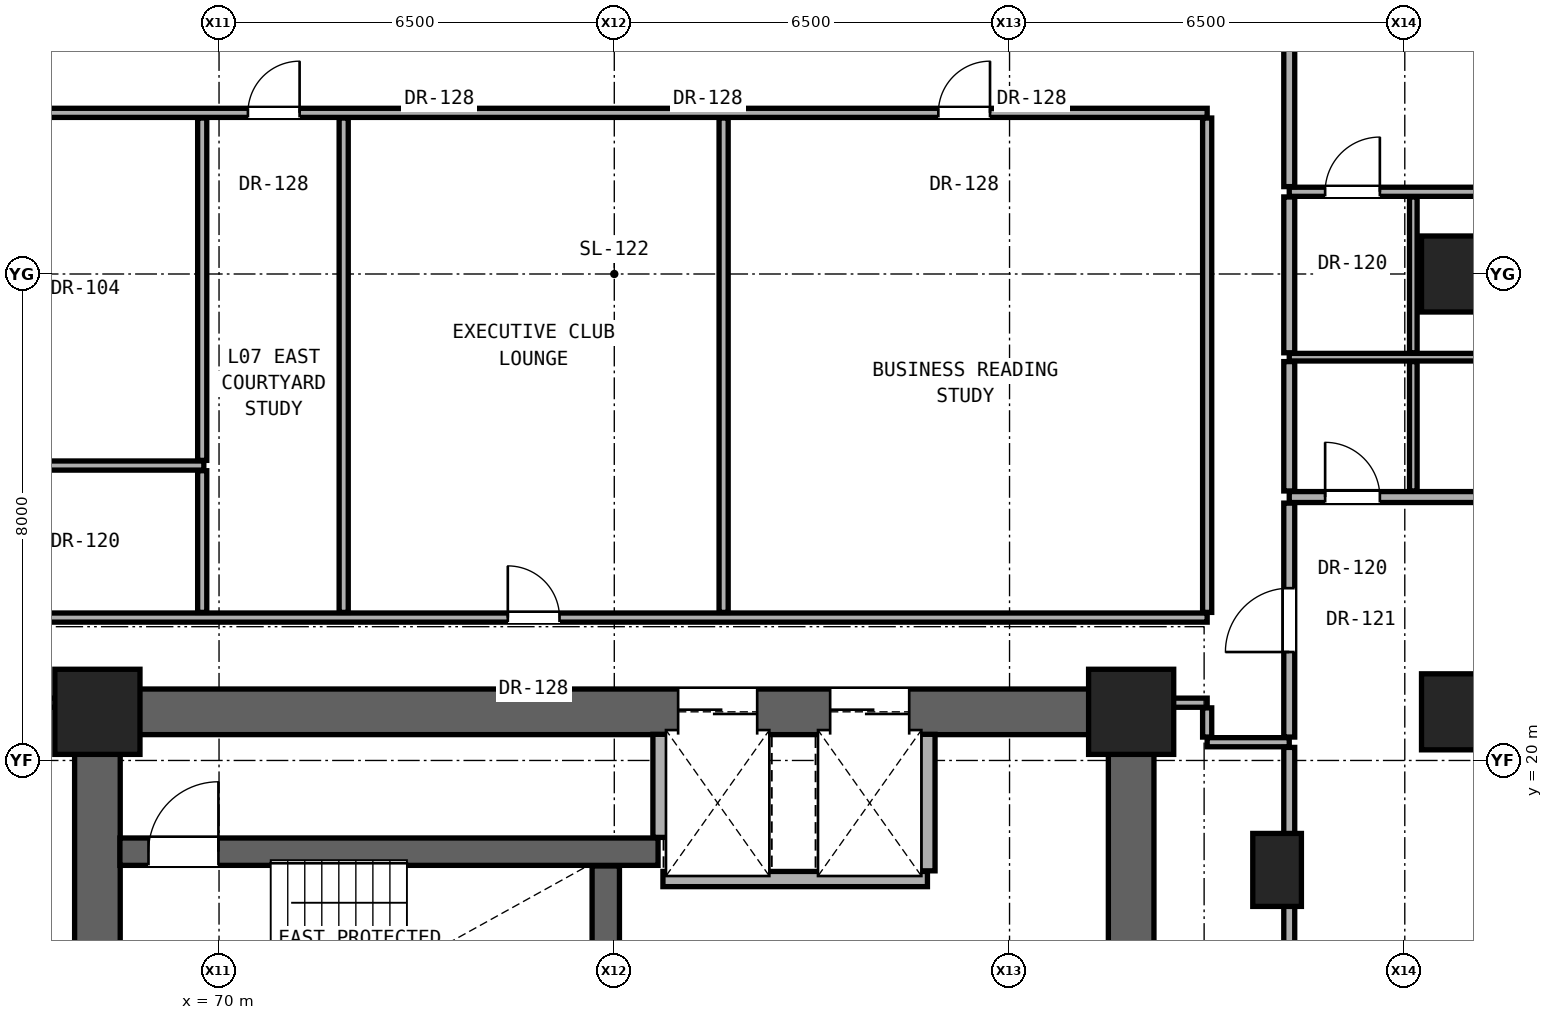
"""IFC4 building model, lengths in metres.
Left out: names, types, materials, properties, quantities, classifications, styles, units other than length and angle.
Written with IfcOpenShell. Run it as: python <this file> out.ifc"""

import sys

from ifc_helpers import new_model, si_unit, direction, frame, frame_2d, origin, origin_2d, place, context, subcontext, project, spatial, rectangle, hollow_rectangle, extrude, element, fill, save


model = new_model("IFC4")
c1 = context("Model", 3, precision=1e-05, world=origin(), true_north=direction((0.0, 1.0)))
c2 = subcontext(c1, "Body", "Model", "MODEL_VIEW")
j1 = project(units=[si_unit("LENGTHUNIT", "METRE"), si_unit("PLANEANGLEUNIT", "RADIAN")], contexts=[c1])
p1 = place(None, origin())
s1 = spatial("IfcSite", under=j1, at=p1, CompositionType="ELEMENT")
p2 = place(p1, origin())
s2 = spatial("IfcBuilding", under=s1, at=p2, CompositionType="ELEMENT")
p3 = place(p2, frame((0.0, 0.0, 29.0)))
s3 = spatial("IfcBuildingStorey", under=s2, at=p3, CompositionType="ELEMENT", Elevation=29.0)
for number, where, z_axis, x_axis in (
    (1, (68.0, 20.8, 0.0), (0.0, 0.0, 1.0), (1.0, 0.0, 0.0)),
    (2, (85.0, 20.8, 0.0), (0.0, 0.0, 1.0), (1.0, 0.0, 0.0)),
):
    element("IfcColumn", number, at=place(p3, frame(where, z_axis=z_axis, x_axis=x_axis)), inside=s3, PredefinedType="COLUMN", context=c2, shape_type="SweptSolid", body=[
        extrude(rectangle(XDim=1.4, YDim=1.4, at=origin_2d()), origin(), (0.0, 0.0, 1.0), 3.3),
    ])
for number, where, z_axis, x_axis in (
    (3, (90.4, 20.8, 0.0), (0.0, 0.0, 1.0), (1.0, 0.0, 0.0)),
    (4, (90.4, 28.0, 0.0), (0.0, 0.0, 1.0), (1.0, 0.0, 0.0)),
):
    element("IfcColumn", number, at=place(p3, frame(where, z_axis=z_axis, x_axis=x_axis)), inside=s3, PredefinedType="COLUMN", context=c2, shape_type="SweptSolid", body=[
        extrude(hollow_rectangle(XDim=1.25, YDim=1.25, WallThickness=0.07, at=origin_2d()), origin(), (0.0, 0.0, 1.0), 3.3),
    ])
p4 = place(p3, frame((87.4, 18.2, 0.0), z_axis=(0.0, 0.0, 1.0), x_axis=(1.0, 0.0, 0.0)))
e5 = element("IfcColumn", 5, at=p4, inside=s3, PredefinedType="PILASTER", context=c2, shape_type="SweptSolid", body=[
    extrude(rectangle(XDim=0.8, YDim=1.2, at=origin_2d()), origin(), (0.0, 0.0, 1.0), 3.3),
])
for number, where, z_axis, x_axis in (
    (6, (68.0, 15.2, 0.0), (0.0, 0.0, 1.0), (0.0, 1.0, 0.0)),
    (7, (85.0, 15.2, 0.0), (0.0, 0.0, 1.0), (0.0, 1.0, 0.0)),
):
    element("IfcWall", number, at=place(p3, frame(where, z_axis=z_axis, x_axis=x_axis)), inside=s3, PredefinedType="SHEAR", context=c2, shape_type="SweptSolid", body=[
        extrude(rectangle(XDim=5.6, YDim=0.75, at=frame_2d((2.8, 0.0))), origin(), (0.0, 0.0, 1.0), 3.06),
    ])
p5 = place(p3, frame((68.0, 20.8, 0.0), z_axis=(0.0, 0.0, 1.0), x_axis=(1.0, 0.0, 0.0)))
e8 = element("IfcWall", 8, at=p5, inside=s3, PredefinedType="SHEAR", context=c2, shape_type="SweptSolid", body=[
    extrude(rectangle(XDim=17.0, YDim=0.75, at=frame_2d((8.5, 0.0))), origin(), (0.0, 0.0, 1.0), 3.06),
])
p6 = place(p5, frame((9.55, 0.0, 0.0)))
e9 = element("IfcOpeningElement", 9, at=p6, cuts=e8, PredefinedType="OPENING", context=c2, shape_type="SweptSolid", body=[
    extrude(rectangle(XDim=1.3, YDim=2.3, at=frame_2d((0.65, 1.15))), frame((0.0, 0.385, 0.0), z_axis=(0.0, -1.0, 0.0), x_axis=(1.0, 0.0, 0.0)), (0.0, 0.0, 1.0), 0.77),
])
p7 = place(p5, frame((12.05, 0.0, 0.0)))
e10 = element("IfcOpeningElement", 10, at=p7, cuts=e8, PredefinedType="OPENING", context=c2, shape_type="SweptSolid", body=[
    extrude(rectangle(XDim=1.3, YDim=2.3, at=frame_2d((0.65, 1.15))), frame((0.0, 0.385, 0.0), z_axis=(0.0, -1.0, 0.0), x_axis=(1.0, 0.0, 0.0)), (0.0, 0.0, 1.0), 0.77),
])
p8 = place(p3, frame((77.3, 18.05, 0.0), z_axis=(0.0, 0.0, 1.0), x_axis=(1.0, 0.0, 0.0)))
e11 = element("IfcWall", 11, at=p8, inside=s3, PredefinedType="SOLIDWALL", context=c2, shape_type="SweptSolid", body=[
    extrude(rectangle(XDim=4.35, YDim=0.25, at=frame_2d((2.175, 0.0))), origin(), (0.0, 0.0, 1.0), 3.06),
])
p9 = place(p3, frame((68.37, 18.5, 0.0), z_axis=(0.0, 0.0, 1.0), x_axis=(1.0, 0.0, 0.0)))
e12 = element("IfcWall", 12, at=p9, inside=s3, PredefinedType="SHEAR", context=c2, shape_type="SweptSolid", body=[
    extrude(rectangle(XDim=8.85, YDim=0.45, at=frame_2d((4.425, 0.0))), origin(), (0.0, 0.0, 1.0), 3.06),
])
p10 = place(p9, frame((0.47, 0.0, 0.0)))
e13 = element("IfcOpeningElement", 13, at=p10, cuts=e12, PredefinedType="OPENING", context=c2, shape_type="SweptSolid", body=[
    extrude(rectangle(XDim=1.15, YDim=2.2, at=frame_2d((0.575, 1.1))), frame((0.0, 0.235, 0.0), z_axis=(0.0, -1.0, 0.0), x_axis=(1.0, 0.0, 0.0)), (0.0, 0.0, 1.0), 0.47),
])
p11 = place(p3, frame((86.25, 20.3, 0.0), z_axis=(0.0, 0.0, 1.0), x_axis=(1.0, 0.0, 0.0)))
e14 = element("IfcWall", 14, at=p11, inside=s3, PredefinedType="PARTITIONING", context=c2, shape_type="SweptSolid", body=[
    extrude(rectangle(XDim=1.35, YDim=0.15, at=frame_2d((0.675, 0.0))), origin(), (0.0, 0.0, 1.0), 3.06),
])
p12 = place(p3, frame((66.62, 20.95, 0.0), z_axis=(0.0, 0.0, 1.0), x_axis=(1.0, 0.0, 0.0)))
e15 = element("IfcWall", 15, at=p12, inside=s3, PredefinedType="PARTITIONING", context=c2, shape_type="SweptSolid", body=[
    extrude(rectangle(XDim=1.01, YDim=0.15, at=frame_2d((0.505, 0.0))), origin(), (0.0, 0.0, 1.0), 2.452),
])
p13 = place(p3, frame((85.37, 20.95, 0.0), z_axis=(0.0, 0.0, 1.0), x_axis=(1.0, 0.0, 0.0)))
e16 = element("IfcWall", 16, at=p13, inside=s3, PredefinedType="PARTITIONING", context=c2, shape_type="SweptSolid", body=[
    extrude(rectangle(XDim=0.88, YDim=0.15, at=frame_2d((0.44, 0.0))), origin(), (0.0, 0.0, 1.0), 2.452),
])
p14 = place(p3, frame((66.62, 22.35, 0.0), z_axis=(0.0, 0.0, 1.0), x_axis=(1.0, 0.0, 0.0)))
e17 = element("IfcWall", 17, at=p14, inside=s3, PredefinedType="PARTITIONING", context=c2, shape_type="SweptSolid", body=[
    extrude(rectangle(XDim=19.63, YDim=0.15, at=frame_2d((9.815, 0.0))), origin(), (0.0, 0.0, 1.0), 2.125),
])
p15 = place(p14, frame((8.129, 0.0, 0.0)))
e18 = element("IfcOpeningElement", 18, at=p15, cuts=e17, PredefinedType="OPENING", context=c2, shape_type="SweptSolid", body=[
    extrude(rectangle(XDim=0.85, YDim=2.01, at=frame_2d((0.425, 1.005))), frame((0.0, 0.085, 0.0), z_axis=(0.0, -1.0, 0.0), x_axis=(1.0, 0.0, 0.0)), (0.0, 0.0, 1.0), 0.17),
])
p16 = place(p3, frame((87.6, 24.332, 0.0), z_axis=(0.0, 0.0, 1.0), x_axis=(1.0, 0.0, 0.0)))
e19 = element("IfcWall", 19, at=p16, inside=s3, PredefinedType="PARTITIONING", context=c2, shape_type="SweptSolid", body=[
    extrude(rectangle(XDim=7.156, YDim=0.18, at=frame_2d((3.578, 0.0))), origin(), (0.0, 0.0, 1.0), 2.196),
])
p17 = place(p16, frame((4.103, 0.0, 0.0)))
e20 = element("IfcOpeningElement", 20, at=p17, cuts=e19, PredefinedType="OPENING", context=c2, shape_type="SweptSolid", body=[
    extrude(rectangle(XDim=0.95, YDim=2.15, at=frame_2d((0.475, 1.075))), frame((0.0, 0.1, 0.0), z_axis=(0.0, -1.0, 0.0), x_axis=(1.0, 0.0, 0.0)), (0.0, 0.0, 1.0), 0.2),
])
p18 = place(p16, frame((0.59, 0.0, 0.0)))
e21 = element("IfcOpeningElement", 21, at=p18, cuts=e19, PredefinedType="OPENING", context=c2, shape_type="SweptSolid", body=[
    extrude(rectangle(XDim=0.9, YDim=2.1, at=frame_2d((0.45, 1.05))), frame((0.0, 0.1, 0.0), z_axis=(0.0, -1.0, 0.0), x_axis=(1.0, 0.0, 0.0)), (0.0, 0.0, 1.0), 0.2),
])
p19 = place(p3, frame((66.62, 24.85, 0.0), z_axis=(0.0, 0.0, 1.0), x_axis=(1.0, 0.0, 0.0)))
e22 = element("IfcWall", 22, at=p19, inside=s3, PredefinedType="PARTITIONING", context=c2, shape_type="SweptSolid", body=[
    extrude(rectangle(XDim=3.13, YDim=0.15, at=frame_2d((1.565, 0.0))), origin(), (0.0, 0.0, 1.0), 2.125),
])
p20 = place(p3, frame((87.6, 26.632, 0.0), z_axis=(0.0, 0.0, 1.0), x_axis=(1.0, 0.0, 0.0)))
e23 = element("IfcWall", 23, at=p20, inside=s3, PredefinedType="PARTITIONING", context=c2, shape_type="SweptSolid", body=[
    extrude(rectangle(XDim=7.156, YDim=0.125, at=frame_2d((3.578, 0.0))), origin(), (0.0, 0.0, 1.0), 2.196),
])
p21 = place(p3, frame((87.6, 29.352, 0.0), z_axis=(0.0, 0.0, 1.0), x_axis=(1.0, 0.0, 0.0)))
e24 = element("IfcWall", 24, at=p21, inside=s3, PredefinedType="PARTITIONING", context=c2, shape_type="SweptSolid", body=[
    extrude(rectangle(XDim=7.156, YDim=0.15, at=frame_2d((3.578, 0.0))), origin(), (0.0, 0.0, 1.0), 2.196),
])
p22 = place(p21, frame((4.103, 0.0, 0.0)))
e25 = element("IfcOpeningElement", 25, at=p22, cuts=e24, PredefinedType="OPENING", context=c2, shape_type="SweptSolid", body=[
    extrude(rectangle(XDim=0.95, YDim=2.15, at=frame_2d((0.475, 1.075))), frame((0.0, 0.085, 0.0), z_axis=(0.0, -1.0, 0.0), x_axis=(1.0, 0.0, 0.0)), (0.0, 0.0, 1.0), 0.17),
])
p23 = place(p21, frame((0.59, 0.0, 0.0)))
e26 = element("IfcOpeningElement", 26, at=p23, cuts=e24, PredefinedType="OPENING", context=c2, shape_type="SweptSolid", body=[
    extrude(rectangle(XDim=0.9, YDim=2.1, at=frame_2d((0.45, 1.05))), frame((0.0, 0.085, 0.0), z_axis=(0.0, -1.0, 0.0), x_axis=(1.0, 0.0, 0.0)), (0.0, 0.0, 1.0), 0.17),
])
p24 = place(p3, frame((66.62, 30.65, 0.0), z_axis=(0.0, 0.0, 1.0), x_axis=(1.0, 0.0, 0.0)))
e27 = element("IfcWall", 27, at=p24, inside=s3, PredefinedType="PARTITIONING", context=c2, shape_type="SweptSolid", body=[
    extrude(rectangle(XDim=19.63, YDim=0.15, at=frame_2d((9.815, 0.0))), origin(), (0.0, 0.0, 1.0), 2.125),
])
p25 = place(p24, frame((3.855, 0.0, 0.0)))
e28 = element("IfcOpeningElement", 28, at=p25, cuts=e27, PredefinedType="OPENING", context=c2, shape_type="SweptSolid", body=[
    extrude(rectangle(XDim=0.85, YDim=2.01, at=frame_2d((0.425, 1.005))), frame((0.0, 0.085, 0.0), z_axis=(0.0, -1.0, 0.0), x_axis=(1.0, 0.0, 0.0)), (0.0, 0.0, 1.0), 0.17),
])
p26 = place(p24, frame((15.209, 0.0, 0.0)))
e29 = element("IfcOpeningElement", 29, at=p26, cuts=e27, PredefinedType="OPENING", context=c2, shape_type="SweptSolid", body=[
    extrude(rectangle(XDim=0.85, YDim=2.01, at=frame_2d((0.425, 1.005))), frame((0.0, 0.085, 0.0), z_axis=(0.0, -1.0, 0.0), x_axis=(1.0, 0.0, 0.0)), (0.0, 0.0, 1.0), 0.17),
])
p27 = place(p3, frame((69.723, 22.435, 0.0), z_axis=(0.0, 0.0, 1.0), x_axis=(0.0, 1.0, 0.0)))
e30 = element("IfcWall", 30, at=p27, inside=s3, PredefinedType="PARTITIONING", context=c2, shape_type="SweptSolid", body=[
    extrude(rectangle(XDim=2.33, YDim=0.15, at=frame_2d((1.165, 0.0))), origin(), (0.0, 0.0, 1.0), 3.06),
])
p28 = place(p3, frame((69.723, 24.935, 0.0), z_axis=(0.0, 0.0, 1.0), x_axis=(0.0, 1.0, 0.0)))
e31 = element("IfcWall", 31, at=p28, inside=s3, PredefinedType="PARTITIONING", context=c2, shape_type="SweptSolid", body=[
    extrude(rectangle(XDim=5.63, YDim=0.15, at=frame_2d((2.815, 0.0))), origin(), (0.0, 0.0, 1.0), 2.125),
])
p29 = place(p3, frame((72.05, 22.435, 0.0), z_axis=(0.0, 0.0, 1.0), x_axis=(0.0, 1.0, 0.0)))
e32 = element("IfcWall", 32, at=p29, inside=s3, PredefinedType="PARTITIONING", context=c2, shape_type="SweptSolid", body=[
    extrude(rectangle(XDim=8.13, YDim=0.15, at=frame_2d((4.065, 0.0))), origin(), (0.0, 0.0, 1.0), 2.125),
])
p30 = place(p3, frame((76.36, 15.915, 0.0), z_axis=(0.0, 0.0, 1.0), x_axis=(0.0, 1.0, 0.0)))
e33 = element("IfcWall", 33, at=p30, inside=s3, PredefinedType="SHEAR", context=c2, shape_type="SweptSolid", body=[
    extrude(rectangle(XDim=2.35, YDim=0.45, at=frame_2d((1.175, 0.0))), origin(), (0.0, 0.0, 1.0), 3.06),
])
p31 = place(p3, frame((77.26, 18.735, 0.0), z_axis=(0.0, 0.0, 1.0), x_axis=(0.0, 1.0, 0.0)))
e34 = element("IfcWall", 34, at=p31, inside=s3, PredefinedType="SOLIDWALL", context=c2, shape_type="SweptSolid", body=[
    extrude(rectangle(XDim=1.695, YDim=0.25, at=frame_2d((0.847, 0.0))), origin(), (0.0, 0.0, 1.0), 3.06),
])
p32 = place(p3, frame((78.298, 22.435, 0.0), z_axis=(0.0, 0.0, 1.0), x_axis=(0.0, 1.0, 0.0)))
e35 = element("IfcWall", 35, at=p32, inside=s3, PredefinedType="PARTITIONING", context=c2, shape_type="SweptSolid", body=[
    extrude(rectangle(XDim=8.13, YDim=0.15, at=frame_2d((4.065, 0.0))), origin(), (0.0, 0.0, 1.0), 2.125),
])
p33 = place(p3, frame((81.65, 18.185, 0.0), z_axis=(0.0, 0.0, 1.0), x_axis=(0.0, 1.0, 0.0)))
e36 = element("IfcWall", 36, at=p33, inside=s3, PredefinedType="SOLIDWALL", context=c2, shape_type="SweptSolid", body=[
    extrude(rectangle(XDim=2.245, YDim=0.25, at=frame_2d((1.123, 0.0))), origin(), (0.0, 0.0, 1.0), 3.06),
])
p34 = place(p3, frame((86.25, 20.385, 0.0), z_axis=(0.0, 0.0, 1.0), x_axis=(0.0, 1.0, 0.0)))
e37 = element("IfcWall", 37, at=p34, inside=s3, PredefinedType="PARTITIONING", context=c2, shape_type="SweptSolid", body=[
    extrude(rectangle(XDim=0.48, YDim=0.15, at=frame_2d((0.24, 0.0))), origin(), (0.0, 0.0, 1.0), 2.452),
])
p35 = place(p3, frame((86.25, 22.435, 0.0), z_axis=(0.0, 0.0, 1.0), x_axis=(0.0, 1.0, 0.0)))
e38 = element("IfcWall", 38, at=p35, inside=s3, PredefinedType="PARTITIONING", context=c2, shape_type="SweptSolid", body=[
    extrude(rectangle(XDim=8.13, YDim=0.15, at=frame_2d((4.065, 0.0))), origin(), (0.0, 0.0, 1.0), 2.279),
])
p36 = place(p3, frame((87.6, 16.533, 0.0), z_axis=(0.0, 0.0, 1.0), x_axis=(0.0, 1.0, 0.0)))
e39 = element("IfcWall", 39, at=p36, inside=s3, PredefinedType="PARTITIONING", context=c2, shape_type="SweptSolid", body=[
    extrude(rectangle(XDim=3.682, YDim=0.18, at=frame_2d((1.841, 0.0))), origin(), (0.0, 0.0, 1.0), 2.436),
])
p37 = place(p3, frame((87.6, 20.385, 0.0), z_axis=(0.0, 0.0, 1.0), x_axis=(0.0, 1.0, 0.0)))
e40 = element("IfcWall", 40, at=p37, inside=s3, PredefinedType="PARTITIONING", context=c2, shape_type="SweptSolid", body=[
    extrude(rectangle(XDim=3.847, YDim=0.18, at=frame_2d((1.923, 0.0))), origin(), (0.0, 0.0, 1.0), 2.452),
])
p38 = place(p37, frame((1.398, 0.0, 0.0)))
e41 = element("IfcOpeningElement", 41, at=p38, cuts=e40, PredefinedType="OPENING", context=c2, shape_type="SweptSolid", body=[
    extrude(rectangle(XDim=1.05, YDim=2.2, at=frame_2d((0.525, 1.1))), frame((0.0, 0.1, 0.0), z_axis=(0.0, -1.0, 0.0), x_axis=(1.0, 0.0, 0.0)), (0.0, 0.0, 1.0), 0.2),
])
p39 = place(p3, frame((87.6, 24.432, 0.0), z_axis=(0.0, 0.0, 1.0), x_axis=(0.0, 1.0, 0.0)))
e42 = element("IfcWall", 42, at=p39, inside=s3, PredefinedType="PARTITIONING", context=c2, shape_type="SweptSolid", body=[
    extrude(rectangle(XDim=2.128, YDim=0.18, at=frame_2d((1.064, 0.0))), origin(), (0.0, 0.0, 1.0), 3.06),
])
p40 = place(p3, frame((87.6, 26.705, 0.0), z_axis=(0.0, 0.0, 1.0), x_axis=(0.0, 1.0, 0.0)))
e43 = element("IfcWall", 43, at=p40, inside=s3, PredefinedType="PARTITIONING", context=c2, shape_type="SweptSolid", body=[
    extrude(rectangle(XDim=2.562, YDim=0.18, at=frame_2d((1.281, 0.0))), origin(), (0.0, 0.0, 1.0), 2.279),
])
p41 = place(p3, frame((87.6, 29.437, 0.0), z_axis=(0.0, 0.0, 1.0), x_axis=(0.0, 1.0, 0.0)))
e44 = element("IfcWall", 44, at=p41, inside=s3, PredefinedType="PARTITIONING", context=c2, shape_type="SweptSolid", body=[
    extrude(rectangle(XDim=6.178, YDim=0.18, at=frame_2d((3.089, 0.0))), origin(), (0.0, 0.0, 1.0), 2.452),
])
p42 = place(p41, frame((2.564, 0.0, 0.0)))
e45 = element("IfcOpeningElement", 45, at=p42, cuts=e44, PredefinedType="OPENING", context=c2, shape_type="SweptSolid", body=[
    extrude(rectangle(XDim=1.05, YDim=2.2, at=frame_2d((0.525, 1.1))), frame((0.0, 0.1, 0.0), z_axis=(0.0, -1.0, 0.0), x_axis=(1.0, 0.0, 0.0)), (0.0, 0.0, 1.0), 0.2),
])
p43 = place(p3, frame((89.64, 24.432, 0.0), z_axis=(0.0, 0.0, 1.0), x_axis=(0.0, 1.0, 0.0)))
e46 = element("IfcWall", 46, at=p43, inside=s3, PredefinedType="PARTITIONING", context=c2, shape_type="SweptSolid", body=[
    extrude(rectangle(XDim=2.128, YDim=0.125, at=frame_2d((1.064, 0.0))), origin(), (0.0, 0.0, 1.0), 3.06),
])
p44 = place(p3, frame((89.64, 26.705, 0.0), z_axis=(0.0, 0.0, 1.0), x_axis=(0.0, 1.0, 0.0)))
e47 = element("IfcWall", 47, at=p44, inside=s3, PredefinedType="PARTITIONING", context=c2, shape_type="SweptSolid", body=[
    extrude(rectangle(XDim=2.562, YDim=0.125, at=frame_2d((1.281, 0.0))), origin(), (0.0, 0.0, 1.0), 2.279),
])
p45 = place(p10, origin())
e48 = element("IfcDoor", 48, at=p45, inside=s3, OperationType="SINGLE_SWING_RIGHT", PredefinedType="DOOR", context=c2, shape_type="SweptSolid", body=[
    extrude(rectangle(XDim=1.15, YDim=2.2, at=frame_2d((0.575, 1.1))), frame((0.0, 0.025, 0.0), z_axis=(0.0, -1.0, 0.0), x_axis=(1.0, 0.0, 0.0)), (0.0, 0.0, 1.0), 0.05),
])
fill(e13, e48)
p46 = place(p38, origin())
e49 = element("IfcDoor", 49, at=p46, inside=s3, OperationType="SINGLE_SWING_LEFT", PredefinedType="DOOR", context=c2, shape_type="SweptSolid", body=[
    extrude(rectangle(XDim=1.05, YDim=2.2, at=frame_2d((0.525, 1.1))), frame((0.0, 0.025, 0.0), z_axis=(0.0, -1.0, 0.0), x_axis=(1.0, 0.0, 0.0)), (0.0, 0.0, 1.0), 0.05),
])
fill(e41, e49)
p47 = place(p18, origin())
e50 = element("IfcDoor", 50, at=p47, inside=s3, OperationType="SINGLE_SWING_LEFT", PredefinedType="DOOR", context=c2, shape_type="SweptSolid", body=[
    extrude(rectangle(XDim=0.9, YDim=2.1, at=frame_2d((0.45, 1.05))), frame((0.0, 0.025, 0.0), z_axis=(0.0, -1.0, 0.0), x_axis=(1.0, 0.0, 0.0)), (0.0, 0.0, 1.0), 0.05),
])
fill(e21, e50)
p48 = place(p23, origin())
e51 = element("IfcDoor", 51, at=p48, inside=s3, OperationType="SINGLE_SWING_RIGHT", PredefinedType="DOOR", context=c2, shape_type="SweptSolid", body=[
    extrude(rectangle(XDim=0.9, YDim=2.1, at=frame_2d((0.45, 1.05))), frame((0.0, 0.025, 0.0), z_axis=(0.0, -1.0, 0.0), x_axis=(1.0, 0.0, 0.0)), (0.0, 0.0, 1.0), 0.05),
])
fill(e26, e51)
p49 = place(p25, origin())
e52 = element("IfcDoor", 52, at=p49, inside=s3, OperationType="SINGLE_SWING_RIGHT", PredefinedType="DOOR", context=c2, shape_type="SweptSolid", body=[
    extrude(rectangle(XDim=0.85, YDim=2.01, at=frame_2d((0.425, 1.005))), frame((0.0, 0.025, 0.0), z_axis=(0.0, -1.0, 0.0), x_axis=(1.0, 0.0, 0.0)), (0.0, 0.0, 1.0), 0.05),
])
fill(e28, e52)
p50 = place(p15, origin())
e53 = element("IfcDoor", 53, at=p50, inside=s3, OperationType="SINGLE_SWING_LEFT", PredefinedType="DOOR", context=c2, shape_type="SweptSolid", body=[
    extrude(rectangle(XDim=0.85, YDim=2.01, at=frame_2d((0.425, 1.005))), frame((0.0, 0.025, 0.0), z_axis=(0.0, -1.0, 0.0), x_axis=(1.0, 0.0, 0.0)), (0.0, 0.0, 1.0), 0.05),
])
fill(e18, e53)
p51 = place(p26, origin())
e54 = element("IfcDoor", 54, at=p51, inside=s3, OperationType="SINGLE_SWING_RIGHT", PredefinedType="DOOR", context=c2, shape_type="SweptSolid", body=[
    extrude(rectangle(XDim=0.85, YDim=2.01, at=frame_2d((0.425, 1.005))), frame((0.0, 0.025, 0.0), z_axis=(0.0, -1.0, 0.0), x_axis=(1.0, 0.0, 0.0)), (0.0, 0.0, 1.0), 0.05),
])
fill(e29, e54)
p52 = place(p6, origin())
e55 = element("IfcDoor", 55, at=p52, inside=s3, OperationType="DOUBLE_DOOR_SLIDING", PredefinedType="DOOR", context=c2, shape_type="SweptSolid", body=[
    extrude(rectangle(XDim=1.3, YDim=2.3, at=frame_2d((0.65, 1.15))), frame((0.0, 0.025, 0.0), z_axis=(0.0, -1.0, 0.0), x_axis=(1.0, 0.0, 0.0)), (0.0, 0.0, 1.0), 0.05),
])
fill(e9, e55)
p53 = place(p7, origin())
e56 = element("IfcDoor", 56, at=p53, inside=s3, OperationType="DOUBLE_DOOR_SLIDING", PredefinedType="DOOR", context=c2, shape_type="SweptSolid", body=[
    extrude(rectangle(XDim=1.3, YDim=2.3, at=frame_2d((0.65, 1.15))), frame((0.0, 0.025, 0.0), z_axis=(0.0, -1.0, 0.0), x_axis=(1.0, 0.0, 0.0)), (0.0, 0.0, 1.0), 0.05),
])
fill(e10, e56)
save(model, sys.argv[1])
